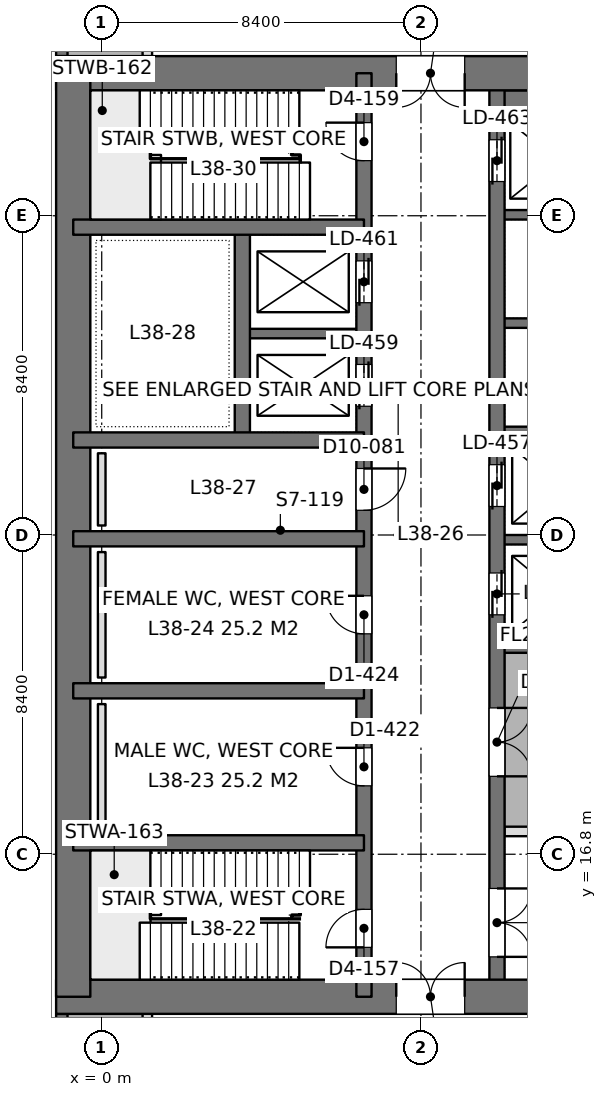
"""IFC4 building model, lengths in metres.
Left out: names, types, materials, properties, quantities, classifications, styles, units other than length and angle.
Written with IfcOpenShell. Run it as: python <this file> out.ifc"""

import sys

from ifc_helpers import new_model, si_unit, direction, frame, frame_2d, origin, place, context, subcontext, project, spatial, rectangle, extrude, element, fill, save


model = new_model("IFC4")
c1 = context("Model", 3, precision=1e-05, world=origin(), true_north=direction((0.0, 1.0)))
c2 = subcontext(c1, "Body", "Model", "MODEL_VIEW")
j1 = project(units=[si_unit("LENGTHUNIT", "METRE"), si_unit("PLANEANGLEUNIT", "RADIAN")], contexts=[c1])
p1 = place(None, origin())
s1 = spatial("IfcSite", under=j1, at=p1, CompositionType="ELEMENT")
p2 = place(p1, origin())
s2 = spatial("IfcBuilding", under=s1, at=p2, CompositionType="ELEMENT")
p3 = place(p2, frame((0.0, 0.0, 168.0)))
s3 = spatial("IfcBuildingStorey", under=s2, at=p3, CompositionType="ELEMENT", Elevation=168.0)
p4 = place(p3, frame((-1.2, 13.05, 0.0), z_axis=(0.0, 0.0, 1.0), x_axis=(1.0, 0.0, 0.0)))
e1 = element("IfcWall", 1, at=p4, inside=s3, PredefinedType="SHEAR", context=c2, shape_type="SweptSolid", body=[
    extrude(rectangle(XDim=18.0, YDim=0.9, at=frame_2d((9.0, 0.0))), origin(), (0.0, 0.0, 1.0), 5.4),
])
p5 = place(p4, frame((8.95, 0.0, 0.0)))
e2 = element("IfcOpeningElement", 2, at=p5, cuts=e1, PredefinedType="OPENING", context=c2, shape_type="SweptSolid", body=[
    extrude(rectangle(XDim=1.8, YDim=2.4, at=frame_2d((0.9, 1.2))), frame((0.0, 0.46, 0.0), z_axis=(0.0, -1.0, 0.0), x_axis=(1.0, 0.0, 0.0)), (0.0, 0.0, 1.0), 0.92),
])
p6 = place(p3, frame((-1.2, 37.35, 0.0), z_axis=(0.0, 0.0, 1.0), x_axis=(1.0, 0.0, 0.0)))
e3 = element("IfcWall", 3, at=p6, inside=s3, PredefinedType="SHEAR", context=c2, shape_type="SweptSolid", body=[
    extrude(rectangle(XDim=18.0, YDim=0.9, at=frame_2d((9.0, 0.0))), origin(), (0.0, 0.0, 1.0), 5.4),
])
p7 = place(p6, frame((8.95, 0.0, 0.0)))
e4 = element("IfcOpeningElement", 4, at=p7, cuts=e3, PredefinedType="OPENING", context=c2, shape_type="SweptSolid", body=[
    extrude(rectangle(XDim=1.8, YDim=2.4, at=frame_2d((0.9, 1.2))), frame((0.0, 0.46, 0.0), z_axis=(0.0, -1.0, 0.0), x_axis=(1.0, 0.0, 0.0)), (0.0, 0.0, 1.0), 0.92),
])
p8 = place(p3, frame((-0.75, 13.05, 0.0), z_axis=(0.0, 0.0, 1.0), x_axis=(0.0, 1.0, 0.0)))
e5 = element("IfcWall", 5, at=p8, inside=s3, PredefinedType="SHEAR", context=c2, shape_type="SweptSolid", body=[
    extrude(rectangle(XDim=24.3, YDim=0.9, at=frame_2d((12.15, 0.0))), origin(), (0.0, 0.0, 1.0), 5.4),
])
p9 = place(p3, frame((6.9, 13.05, 0.0), z_axis=(0.0, 0.0, 1.0), x_axis=(0.0, 1.0, 0.0)))
e6 = element("IfcWall", 6, at=p9, inside=s3, PredefinedType="SHEAR", context=c2, shape_type="SweptSolid", body=[
    extrude(rectangle(XDim=24.3, YDim=0.4, at=frame_2d((12.15, 0.0))), origin(), (0.0, 0.0, 1.0), 5.4),
])
p10 = place(p9, frame((1.3, 0.0, 0.0)))
e7 = element("IfcOpeningElement", 7, at=p10, cuts=e6, PredefinedType="OPENING", context=c2, shape_type="SweptSolid", body=[
    extrude(rectangle(XDim=1.0, YDim=2.2, at=frame_2d((0.5, 1.1))), frame((0.0, 0.21, 0.0), z_axis=(0.0, -1.0, 0.0), x_axis=(1.0, 0.0, 0.0)), (0.0, 0.0, 1.0), 0.42),
])
p11 = place(p9, frame((22.0, 0.0, 0.0)))
e8 = element("IfcOpeningElement", 8, at=p11, cuts=e6, PredefinedType="OPENING", context=c2, shape_type="SweptSolid", body=[
    extrude(rectangle(XDim=1.0, YDim=2.2, at=frame_2d((0.5, 1.1))), frame((0.0, 0.21, 0.0), z_axis=(0.0, -1.0, 0.0), x_axis=(1.0, 0.0, 0.0)), (0.0, 0.0, 1.0), 0.42),
])
p12 = place(p9, frame((5.55, 0.0, 0.0)))
e9 = element("IfcOpeningElement", 9, at=p12, cuts=e6, PredefinedType="OPENING", context=c2, shape_type="SweptSolid", body=[
    extrude(rectangle(XDim=1.0, YDim=2.2, at=frame_2d((0.5, 1.1))), frame((0.0, 0.21, 0.0), z_axis=(0.0, -1.0, 0.0), x_axis=(1.0, 0.0, 0.0)), (0.0, 0.0, 1.0), 0.42),
])
p13 = place(p9, frame((9.55, 0.0, 0.0)))
e10 = element("IfcOpeningElement", 10, at=p13, cuts=e6, PredefinedType="OPENING", context=c2, shape_type="SweptSolid", body=[
    extrude(rectangle(XDim=1.0, YDim=2.2, at=frame_2d((0.5, 1.1))), frame((0.0, 0.21, 0.0), z_axis=(0.0, -1.0, 0.0), x_axis=(1.0, 0.0, 0.0)), (0.0, 0.0, 1.0), 0.42),
])
p14 = place(p9, frame((12.8, 0.0, 0.0)))
e11 = element("IfcOpeningElement", 11, at=p14, cuts=e6, PredefinedType="OPENING", context=c2, shape_type="SweptSolid", body=[
    extrude(rectangle(XDim=1.1, YDim=2.2, at=frame_2d((0.55, 1.1))), frame((0.0, 0.21, 0.0), z_axis=(0.0, -1.0, 0.0), x_axis=(1.0, 0.0, 0.0)), (0.0, 0.0, 1.0), 0.42),
])
p15 = place(p9, frame((15.538, 0.0, 0.0)))
e12 = element("IfcOpeningElement", 12, at=p15, cuts=e6, PredefinedType="OPENING", context=c2, shape_type="SweptSolid", body=[
    extrude(rectangle(XDim=1.1, YDim=2.2, at=frame_2d((0.55, 1.1))), frame((0.0, 0.21, 0.0), z_axis=(0.0, -1.0, 0.0), x_axis=(1.0, 0.0, 0.0)), (0.0, 0.0, 1.0), 0.42),
])
p16 = place(p9, frame((18.262, 0.0, 0.0)))
e13 = element("IfcOpeningElement", 13, at=p16, cuts=e6, PredefinedType="OPENING", context=c2, shape_type="SweptSolid", body=[
    extrude(rectangle(XDim=1.1, YDim=2.2, at=frame_2d((0.55, 1.1))), frame((0.0, 0.21, 0.0), z_axis=(0.0, -1.0, 0.0), x_axis=(1.0, 0.0, 0.0)), (0.0, 0.0, 1.0), 0.42),
])
p17 = place(p3, frame((10.4, 13.05, 0.0), z_axis=(0.0, 0.0, 1.0), x_axis=(0.0, 1.0, 0.0)))
e14 = element("IfcWall", 14, at=p17, inside=s3, PredefinedType="SHEAR", context=c2, shape_type="SweptSolid", body=[
    extrude(rectangle(XDim=24.3, YDim=0.4, at=frame_2d((12.15, 0.0))), origin(), (0.0, 0.0, 1.0), 5.4),
])
p18 = place(p17, frame((10.05, 0.0, 0.0)))
e15 = element("IfcOpeningElement", 15, at=p18, cuts=e14, PredefinedType="OPENING", context=c2, shape_type="SweptSolid", body=[
    extrude(rectangle(XDim=1.1, YDim=2.2, at=frame_2d((0.55, 1.1))), frame((0.0, 0.21, 0.0), z_axis=(0.0, -1.0, 0.0), x_axis=(1.0, 0.0, 0.0)), (0.0, 0.0, 1.0), 0.42),
])
p19 = place(p17, frame((12.9, 0.0, 0.0)))
e16 = element("IfcOpeningElement", 16, at=p19, cuts=e14, PredefinedType="OPENING", context=c2, shape_type="SweptSolid", body=[
    extrude(rectangle(XDim=1.1, YDim=2.2, at=frame_2d((0.55, 1.1))), frame((0.0, 0.21, 0.0), z_axis=(0.0, -1.0, 0.0), x_axis=(1.0, 0.0, 0.0)), (0.0, 0.0, 1.0), 0.42),
])
p20 = place(p17, frame((21.45, 0.0, 0.0)))
e17 = element("IfcOpeningElement", 17, at=p20, cuts=e14, PredefinedType="OPENING", context=c2, shape_type="SweptSolid", body=[
    extrude(rectangle(XDim=1.1, YDim=2.2, at=frame_2d((0.55, 1.1))), frame((0.0, 0.21, 0.0), z_axis=(0.0, -1.0, 0.0), x_axis=(1.0, 0.0, 0.0)), (0.0, 0.0, 1.0), 0.42),
])
p21 = place(p17, frame((5.8, 0.0, 0.0)))
e18 = element("IfcOpeningElement", 18, at=p21, cuts=e14, PredefinedType="OPENING", context=c2, shape_type="SweptSolid", body=[
    extrude(rectangle(XDim=1.8, YDim=2.4, at=frame_2d((0.9, 1.2))), frame((0.0, 0.21, 0.0), z_axis=(0.0, -1.0, 0.0), x_axis=(1.0, 0.0, 0.0)), (0.0, 0.0, 1.0), 0.42),
])
p22 = place(p17, frame((1.05, 0.0, 0.0)))
e19 = element("IfcOpeningElement", 19, at=p22, cuts=e14, PredefinedType="OPENING", context=c2, shape_type="SweptSolid", body=[
    extrude(rectangle(XDim=1.8, YDim=2.4, at=frame_2d((0.9, 1.2))), frame((0.0, 0.21, 0.0), z_axis=(0.0, -1.0, 0.0), x_axis=(1.0, 0.0, 0.0)), (0.0, 0.0, 1.0), 0.42),
])
for number, where, z_axis, x_axis in (
    (20, (-0.75, 17.1, 0.0), (0.0, 0.0, 1.0), (1.0, 0.0, 0.0)),
    (21, (-0.75, 21.1, 0.0), (0.0, 0.0, 1.0), (1.0, 0.0, 0.0)),
    (22, (-0.75, 25.1, 0.0), (0.0, 0.0, 1.0), (1.0, 0.0, 0.0)),
    (23, (-0.75, 27.7, 0.0), (0.0, 0.0, 1.0), (1.0, 0.0, 0.0)),
    (24, (-0.75, 33.3, 0.0), (0.0, 0.0, 1.0), (1.0, 0.0, 0.0)),
):
    element("IfcWall", number, at=place(p3, frame(where, z_axis=z_axis, x_axis=x_axis)), inside=s3, PredefinedType="SHEAR", context=c2, shape_type="SweptSolid", body=[
        extrude(rectangle(XDim=7.65, YDim=0.4, at=frame_2d((3.825, 0.0))), origin(), (0.0, 0.0, 1.0), 5.4),
    ])
p23 = place(p3, frame((3.7, 27.7, 0.0), z_axis=(0.0, 0.0, 1.0), x_axis=(0.0, 1.0, 0.0)))
e25 = element("IfcWall", 25, at=p23, inside=s3, PredefinedType="SHEAR", context=c2, shape_type="SweptSolid", body=[
    extrude(rectangle(XDim=5.6, YDim=0.4, at=frame_2d((2.8, 0.0))), origin(), (0.0, 0.0, 1.0), 5.4),
])
p24 = place(p3, frame((3.7, 30.5, 0.0), z_axis=(0.0, 0.0, 1.0), x_axis=(1.0, 0.0, 0.0)))
e26 = element("IfcWall", 26, at=p24, inside=s3, PredefinedType="SHEAR", context=c2, shape_type="SweptSolid", body=[
    extrude(rectangle(XDim=3.2, YDim=0.25, at=frame_2d((1.6, 0.0))), origin(), (0.0, 0.0, 1.0), 5.4),
])
p25 = place(p3, frame((10.4, 22.225, 0.0), z_axis=(0.0, 0.0, 1.0), x_axis=(1.0, 0.0, 0.0)))
e27 = element("IfcWall", 27, at=p25, inside=s3, PredefinedType="SHEAR", context=c2, shape_type="SweptSolid", body=[
    extrude(rectangle(XDim=5.95, YDim=0.25, at=frame_2d((2.975, 0.0))), origin(), (0.0, 0.0, 1.0), 5.4),
])
for number, where, z_axis, x_axis in (
    (28, (10.4, 25.075, 0.0), (0.0, 0.0, 1.0), (1.0, 0.0, 0.0)),
    (29, (10.4, 27.925, 0.0), (0.0, 0.0, 1.0), (1.0, 0.0, 0.0)),
    (30, (10.4, 30.775, 0.0), (0.0, 0.0, 1.0), (1.0, 0.0, 0.0)),
    (31, (10.4, 33.625, 0.0), (0.0, 0.0, 1.0), (1.0, 0.0, 0.0)),
):
    element("IfcWall", number, at=place(p3, frame(where, z_axis=z_axis, x_axis=x_axis)), inside=s3, PredefinedType="SHEAR", context=c2, shape_type="SweptSolid", body=[
        extrude(rectangle(XDim=3.2, YDim=0.25, at=frame_2d((1.6, 0.0))), origin(), (0.0, 0.0, 1.0), 5.4),
    ])
p26 = place(p3, frame((10.4, 36.625, 0.0), z_axis=(0.0, 0.0, 1.0), x_axis=(1.0, 0.0, 0.0)))
e32 = element("IfcWall", 32, at=p26, inside=s3, PredefinedType="SHEAR", context=c2, shape_type="SweptSolid", body=[
    extrude(rectangle(XDim=3.2, YDim=0.55, at=frame_2d((1.6, 0.0))), origin(), (0.0, 0.0, 1.0), 5.4),
])
p27 = place(p3, frame((-1.05, 8.4, 0.0), z_axis=(0.0, 0.0, 1.0), x_axis=(0.0, 1.0, 0.0)))
e33 = element("IfcWall", 33, at=p27, inside=s3, PredefinedType="SOLIDWALL", context=c2, shape_type="SweptSolid", body=[
    extrude(rectangle(XDim=4.2, YDim=0.3, at=frame_2d((2.1, 0.0))), origin(), (0.0, 0.0, 1.0), 5.25),
])
p28 = place(p27, frame((0.9, 0.0, 1.2)))
e34 = element("IfcOpeningElement", 34, at=p28, cuts=e33, PredefinedType="OPENING", context=c2, shape_type="SweptSolid", body=[
    extrude(rectangle(XDim=2.4, YDim=2.4, at=frame_2d((1.2, 1.2))), frame((0.0, 0.16, 0.0), z_axis=(0.0, -1.0, 0.0), x_axis=(1.0, 0.0, 0.0)), (0.0, 0.0, 1.0), 0.32),
])
p29 = place(p3, frame((-1.05, 37.8, 0.0), z_axis=(0.0, 0.0, 1.0), x_axis=(0.0, 1.0, 0.0)))
e35 = element("IfcWall", 35, at=p29, inside=s3, PredefinedType="SOLIDWALL", context=c2, shape_type="SweptSolid", body=[
    extrude(rectangle(XDim=4.2, YDim=0.3, at=frame_2d((2.1, 0.0))), origin(), (0.0, 0.0, 1.0), 5.25),
])
p30 = place(p29, frame((0.9, 0.0, 1.2)))
e36 = element("IfcOpeningElement", 36, at=p30, cuts=e35, PredefinedType="OPENING", context=c2, shape_type="SweptSolid", body=[
    extrude(rectangle(XDim=2.4, YDim=2.4, at=frame_2d((1.2, 1.2))), frame((0.0, 0.16, 0.0), z_axis=(0.0, -1.0, 0.0), x_axis=(1.0, 0.0, 0.0)), (0.0, 0.0, 1.0), 0.32),
])
p31 = place(p3, frame((10.598, 17.4, 0.0), z_axis=(0.0, 0.0, 1.0), x_axis=(1.0, 0.0, 0.0)))
e37 = element("IfcWall", 37, at=p31, inside=s3, PredefinedType="PARTITIONING", context=c2, shape_type="SweptSolid", body=[
    extrude(rectangle(XDim=5.904, YDim=0.25, at=frame_2d((2.952, 0.0))), origin(), (0.0, 0.0, 1.0), 4.75),
])
p32 = place(p3, frame((1.2, 10.8, 0.0), z_axis=(0.0, 0.0, 1.0), x_axis=(0.0, 1.0, 0.0)))
e38 = element("IfcWall", 38, at=p32, inside=s3, PredefinedType="PARTITIONING", context=c2, shape_type="SweptSolid", body=[
    extrude(rectangle(XDim=1.802, YDim=0.25, at=frame_2d((0.901, 0.0))), origin(), (0.0, 0.0, 1.0), 5.25),
])
p33 = place(p3, frame((1.2, 37.8, 0.0), z_axis=(0.0, 0.0, 1.0), x_axis=(0.0, 1.0, 0.0)))
e39 = element("IfcWall", 39, at=p33, inside=s3, PredefinedType="PARTITIONING", context=c2, shape_type="SweptSolid", body=[
    extrude(rectangle(XDim=1.8, YDim=0.25, at=frame_2d((0.9, 0.0))), origin(), (0.0, 0.0, 1.0), 5.25),
])
for number, where, z_axis, x_axis in (
    (40, (0.0, 17.45, 0.0), (0.0, 0.0, 1.0), (0.0, 1.0, 0.0)),
    (41, (0.0, 21.45, 0.0), (0.0, 0.0, 1.0), (0.0, 1.0, 0.0)),
):
    element("IfcWall", number, at=place(p3, frame(where, z_axis=z_axis, x_axis=x_axis)), inside=s3, PredefinedType="PLUMBINGWALL", context=c2, shape_type="SweptSolid", body=[
        extrude(rectangle(XDim=3.3, YDim=0.2, at=frame_2d((1.65, 0.0))), origin(), (0.0, 0.0, 1.0), 1.2),
    ])
p34 = place(p3, frame((0.0, 25.45, 0.0), z_axis=(0.0, 0.0, 1.0), x_axis=(0.0, 1.0, 0.0)))
e42 = element("IfcWall", 42, at=p34, inside=s3, PredefinedType="PLUMBINGWALL", context=c2, shape_type="SweptSolid", body=[
    extrude(rectangle(XDim=1.9, YDim=0.2, at=frame_2d((0.95, 0.0))), origin(), (0.0, 0.0, 1.0), 1.2),
])
p35 = place(p5, origin())
e43 = element("IfcDoor", 43, at=p35, inside=s3, OperationType="DOUBLE_DOOR_SINGLE_SWING", PredefinedType="DOOR", context=c2, shape_type="SweptSolid", body=[
    extrude(rectangle(XDim=1.8, YDim=2.4, at=frame_2d((0.9, 1.2))), frame((0.0, 0.025, 0.0), z_axis=(0.0, -1.0, 0.0), x_axis=(1.0, 0.0, 0.0)), (0.0, 0.0, 1.0), 0.05),
])
fill(e2, e43)
p36 = place(p7, frame((1.8, 0.0, 0.0), z_axis=(0.0, 0.0, 1.0), x_axis=(-1.0, 0.0, 0.0)))
e44 = element("IfcDoor", 44, at=p36, inside=s3, OperationType="DOUBLE_DOOR_SINGLE_SWING", PredefinedType="DOOR", context=c2, shape_type="SweptSolid", body=[
    extrude(rectangle(XDim=1.8, YDim=2.4, at=frame_2d((0.9, 1.2))), frame((0.0, 0.025, 0.0), z_axis=(0.0, -1.0, 0.0), x_axis=(1.0, 0.0, 0.0)), (0.0, 0.0, 1.0), 0.05),
])
fill(e4, e44)
p37 = place(p10, origin())
e45 = element("IfcDoor", 45, at=p37, inside=s3, OperationType="SINGLE_SWING_LEFT", PredefinedType="DOOR", context=c2, shape_type="SweptSolid", body=[
    extrude(rectangle(XDim=1.0, YDim=2.2, at=frame_2d((0.5, 1.1))), frame((0.0, 0.025, 0.0), z_axis=(0.0, -1.0, 0.0), x_axis=(1.0, 0.0, 0.0)), (0.0, 0.0, 1.0), 0.05),
])
fill(e7, e45)
p38 = place(p11, origin())
e46 = element("IfcDoor", 46, at=p38, inside=s3, OperationType="SINGLE_SWING_RIGHT", PredefinedType="DOOR", context=c2, shape_type="SweptSolid", body=[
    extrude(rectangle(XDim=1.0, YDim=2.2, at=frame_2d((0.5, 1.1))), frame((0.0, 0.025, 0.0), z_axis=(0.0, -1.0, 0.0), x_axis=(1.0, 0.0, 0.0)), (0.0, 0.0, 1.0), 0.05),
])
fill(e8, e46)
p39 = place(p12, origin())
e47 = element("IfcDoor", 47, at=p39, inside=s3, OperationType="SINGLE_SWING_RIGHT", PredefinedType="DOOR", context=c2, shape_type="SweptSolid", body=[
    extrude(rectangle(XDim=1.0, YDim=2.2, at=frame_2d((0.5, 1.1))), frame((0.0, 0.025, 0.0), z_axis=(0.0, -1.0, 0.0), x_axis=(1.0, 0.0, 0.0)), (0.0, 0.0, 1.0), 0.05),
])
fill(e9, e47)
p40 = place(p13, origin())
e48 = element("IfcDoor", 48, at=p40, inside=s3, OperationType="SINGLE_SWING_RIGHT", PredefinedType="DOOR", context=c2, shape_type="SweptSolid", body=[
    extrude(rectangle(XDim=1.0, YDim=2.2, at=frame_2d((0.5, 1.1))), frame((0.0, 0.025, 0.0), z_axis=(0.0, -1.0, 0.0), x_axis=(1.0, 0.0, 0.0)), (0.0, 0.0, 1.0), 0.05),
])
fill(e10, e48)
p41 = place(p14, frame((1.1, 0.0, 0.0), z_axis=(0.0, 0.0, 1.0), x_axis=(-1.0, 0.0, 0.0)))
e49 = element("IfcDoor", 49, at=p41, inside=s3, OperationType="SINGLE_SWING_LEFT", PredefinedType="DOOR", context=c2, shape_type="SweptSolid", body=[
    extrude(rectangle(XDim=1.1, YDim=2.2, at=frame_2d((0.55, 1.1))), frame((0.0, 0.025, 0.0), z_axis=(0.0, -1.0, 0.0), x_axis=(1.0, 0.0, 0.0)), (0.0, 0.0, 1.0), 0.05),
])
fill(e11, e49)
p42 = place(p18, origin())
e50 = element("IfcDoor", 50, at=p42, inside=s3, OperationType="DOUBLE_DOOR_SLIDING", PredefinedType="DOOR", context=c2, shape_type="SweptSolid", body=[
    extrude(rectangle(XDim=1.1, YDim=2.2, at=frame_2d((0.55, 1.1))), frame((0.0, 0.025, 0.0), z_axis=(0.0, -1.0, 0.0), x_axis=(1.0, 0.0, 0.0)), (0.0, 0.0, 1.0), 0.05),
])
fill(e15, e50)
p43 = place(p19, origin())
e51 = element("IfcDoor", 51, at=p43, inside=s3, OperationType="DOUBLE_DOOR_SLIDING", PredefinedType="DOOR", context=c2, shape_type="SweptSolid", body=[
    extrude(rectangle(XDim=1.1, YDim=2.2, at=frame_2d((0.55, 1.1))), frame((0.0, 0.025, 0.0), z_axis=(0.0, -1.0, 0.0), x_axis=(1.0, 0.0, 0.0)), (0.0, 0.0, 1.0), 0.05),
])
fill(e16, e51)
p44 = place(p20, origin())
e52 = element("IfcDoor", 52, at=p44, inside=s3, OperationType="DOUBLE_DOOR_SLIDING", PredefinedType="DOOR", context=c2, shape_type="SweptSolid", body=[
    extrude(rectangle(XDim=1.1, YDim=2.2, at=frame_2d((0.55, 1.1))), frame((0.0, 0.025, 0.0), z_axis=(0.0, -1.0, 0.0), x_axis=(1.0, 0.0, 0.0)), (0.0, 0.0, 1.0), 0.05),
])
fill(e17, e52)
p45 = place(p15, origin())
e53 = element("IfcDoor", 53, at=p45, inside=s3, OperationType="DOUBLE_DOOR_SLIDING", PredefinedType="DOOR", context=c2, shape_type="SweptSolid", body=[
    extrude(rectangle(XDim=1.1, YDim=2.2, at=frame_2d((0.55, 1.1))), frame((0.0, 0.025, 0.0), z_axis=(0.0, -1.0, 0.0), x_axis=(1.0, 0.0, 0.0)), (0.0, 0.0, 1.0), 0.05),
])
fill(e12, e53)
p46 = place(p16, origin())
e54 = element("IfcDoor", 54, at=p46, inside=s3, OperationType="DOUBLE_DOOR_SLIDING", PredefinedType="DOOR", context=c2, shape_type="SweptSolid", body=[
    extrude(rectangle(XDim=1.1, YDim=2.2, at=frame_2d((0.55, 1.1))), frame((0.0, 0.025, 0.0), z_axis=(0.0, -1.0, 0.0), x_axis=(1.0, 0.0, 0.0)), (0.0, 0.0, 1.0), 0.05),
])
fill(e13, e54)
p47 = place(p21, frame((1.8, 0.0, 0.0), z_axis=(0.0, 0.0, 1.0), x_axis=(-1.0, 0.0, 0.0)))
e55 = element("IfcDoor", 55, at=p47, inside=s3, OperationType="DOUBLE_DOOR_SINGLE_SWING", PredefinedType="DOOR", context=c2, shape_type="SweptSolid", body=[
    extrude(rectangle(XDim=1.8, YDim=2.4, at=frame_2d((0.9, 1.2))), frame((0.0, 0.025, 0.0), z_axis=(0.0, -1.0, 0.0), x_axis=(1.0, 0.0, 0.0)), (0.0, 0.0, 1.0), 0.05),
])
fill(e18, e55)
p48 = place(p22, frame((1.8, 0.0, 0.0), z_axis=(0.0, 0.0, 1.0), x_axis=(-1.0, 0.0, 0.0)))
e56 = element("IfcDoor", 56, at=p48, inside=s3, OperationType="DOUBLE_DOOR_SINGLE_SWING", PredefinedType="DOOR", context=c2, shape_type="SweptSolid", body=[
    extrude(rectangle(XDim=1.8, YDim=2.4, at=frame_2d((0.9, 1.2))), frame((0.0, 0.025, 0.0), z_axis=(0.0, -1.0, 0.0), x_axis=(1.0, 0.0, 0.0)), (0.0, 0.0, 1.0), 0.05),
])
fill(e19, e56)
save(model, sys.argv[1])
